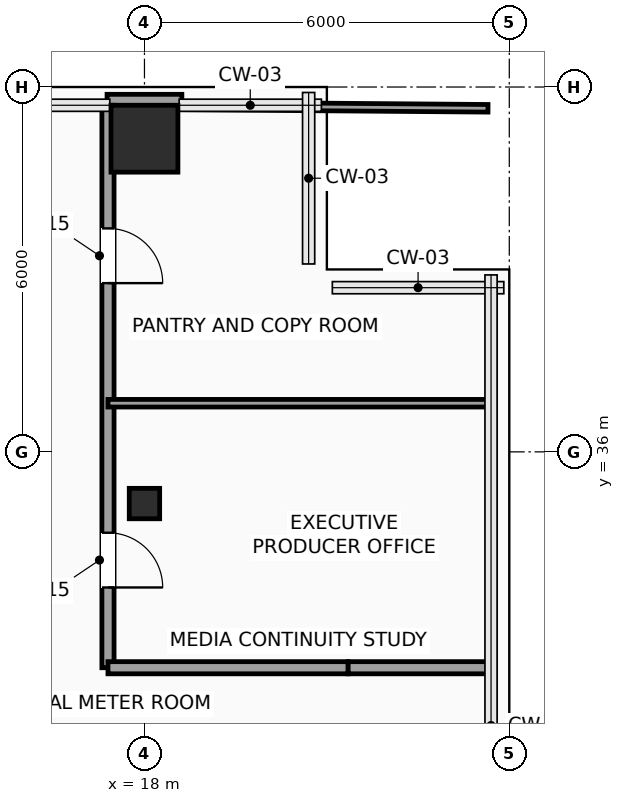
"""IFC4 building model, lengths in metres.
Left out: names, types, materials, properties, quantities, classifications, styles, units other than length and angle.
Written with IfcOpenShell. Run it as: python <this file> out.ifc"""

import sys

from ifc_helpers import new_model, si_unit, direction, frame, frame_2d, origin, origin_2d, place, context, subcontext, project, spatial, rectangle, hollow_rectangle, extrude, element, fill, save


model = new_model("IFC4")
c1 = context("Model", 3, precision=1e-05, world=origin(), true_north=direction((0.0, 1.0)))
c2 = subcontext(c1, "Body", "Model", "MODEL_VIEW")
j1 = project(units=[si_unit("LENGTHUNIT", "METRE"), si_unit("PLANEANGLEUNIT", "RADIAN")], contexts=[c1])
p1 = place(None, origin())
s1 = spatial("IfcSite", under=j1, at=p1, CompositionType="ELEMENT")
p2 = place(p1, origin())
s2 = spatial("IfcBuilding", under=s1, at=p2, CompositionType="ELEMENT")
p3 = place(p2, frame((0.0, 0.0, 153.15)))
s3 = spatial("IfcBuildingStorey", under=s2, at=p3, CompositionType="ELEMENT", Elevation=153.15)
p4 = place(p3, frame((18.0, 35.15, 0.0), z_axis=(0.0, 0.0, 1.0), x_axis=(1.0, 0.0, 0.0)))
e1 = element("IfcColumn", 1, at=p4, inside=s3, PredefinedType="COLUMN", context=c2, shape_type="SweptSolid", body=[
    extrude(hollow_rectangle(XDim=0.5, YDim=0.5, WallThickness=0.025, InnerFilletRadius=0.025, OuterFilletRadius=0.04, at=origin_2d()), origin(), (0.0, 0.0, 1.0), 3.75),
])
p5 = place(p3, frame((18.0, 41.15, 0.0), z_axis=(0.0, 0.0, 1.0), x_axis=(1.0, 0.0, 0.0)))
e2 = element("IfcColumn", 2, at=p5, inside=s3, PredefinedType="COLUMN", context=c2, shape_type="SweptSolid", body=[
    extrude(rectangle(XDim=1.1, YDim=1.1, at=origin_2d()), origin(), (0.0, 0.0, 1.0), 3.75),
])
p6 = place(p3, frame((17.385, 41.76, 0.0), z_axis=(0.0, 0.0, 1.0), x_axis=(1.0, 0.0, 0.0)))
e3 = element("IfcWall", 3, at=p6, inside=s3, PredefinedType="SOLIDWALL", context=c2, shape_type="SweptSolid", body=[
    extrude(rectangle(XDim=1.23, YDim=0.24, at=frame_2d((0.615, 0.0))), origin(), (0.0, 0.0, 1.0), 3.525),
])
p7 = place(p3, frame((17.4, 41.7, 0.0), z_axis=(0.0, 0.0, 1.0), x_axis=(0.0, -1.0, 0.0)))
e4 = element("IfcWall", 4, at=p7, inside=s3, PredefinedType="SOLIDWALL", context=c2, shape_type="SweptSolid", body=[
    extrude(rectangle(XDim=9.25, YDim=0.2, at=frame_2d((4.625, 0.0))), origin(), (0.0, 0.0, 1.0), 3.525),
])
p8 = place(p7, frame((7.03, 0.0, 0.0)))
e5 = element("IfcOpeningElement", 5, at=p8, cuts=e4, PredefinedType="OPENING", context=c2, shape_type="SweptSolid", body=[
    extrude(rectangle(XDim=0.9, YDim=2.1, at=frame_2d((0.45, 1.05))), frame((0.0, 0.11, 0.0), z_axis=(0.0, -1.0, 0.0), x_axis=(1.0, 0.0, 0.0)), (0.0, 0.0, 1.0), 0.22),
])
p9 = place(p7, frame((2.025, 0.0, 0.0)))
e6 = element("IfcOpeningElement", 6, at=p9, cuts=e4, PredefinedType="OPENING", context=c2, shape_type="SweptSolid", body=[
    extrude(rectangle(XDim=0.9, YDim=2.1, at=frame_2d((0.45, 1.05))), frame((0.0, 0.11, 0.0), z_axis=(0.0, -1.0, 0.0), x_axis=(1.0, 0.0, 0.0)), (0.0, 0.0, 1.0), 0.22),
])
p10 = place(p3, frame((17.4, 32.45, 0.0), z_axis=(0.0, 0.0, 1.0), x_axis=(1.0, 0.0, 0.0)))
e7 = element("IfcWall", 7, at=p10, inside=s3, PredefinedType="SOLIDWALL", context=c2, shape_type="SweptSolid", body=[
    extrude(rectangle(XDim=3.95, YDim=0.2, at=frame_2d((1.975, 0.0))), origin(), (0.0, 0.0, 1.0), 3.525),
])
p11 = place(p3, frame((21.35, 32.45, 0.0), z_axis=(0.0, 0.0, 1.0), x_axis=(1.0, 0.0, 0.0)))
e8 = element("IfcWall", 8, at=p11, inside=s3, PredefinedType="SOLIDWALL", context=c2, shape_type="SweptSolid", body=[
    extrude(rectangle(XDim=2.35, YDim=0.2, at=frame_2d((1.175, 0.0))), origin(), (0.0, 0.0, 1.0), 3.525),
])
p12 = place(p3, frame((17.4, 36.8, 0.0), z_axis=(0.0, 0.0, 1.0), x_axis=(1.0, 0.0, 0.0)))
e9 = element("IfcWall", 9, at=p12, inside=s3, PredefinedType="PARTITIONING", context=c2, shape_type="SweptSolid", body=[
    extrude(rectangle(XDim=6.3, YDim=0.125, at=frame_2d((3.15, 0.0))), origin(), (0.0, 0.0, 1.0), 3.525),
])
p13 = place(p3, frame((18.615, 41.69, 0.0), z_axis=(0.0, 0.0, 1.0), x_axis=(0.99996799533, -0.008000519771, 0.0)))
e10 = element("IfcWall", 10, at=p13, inside=s3, PredefinedType="PARTITIONING", context=c2, shape_type="SweptSolid", body=[
    extrude(rectangle(XDim=5.035, YDim=0.125, at=frame_2d((2.518, 0.0))), origin(), (0.0, 0.0, 1.0), 3.525),
])
p14 = place(p8, origin())
e11 = element("IfcDoor", 11, at=p14, inside=s3, OperationType="SINGLE_SWING_RIGHT", PredefinedType="DOOR", context=c2, shape_type="SweptSolid", body=[
    extrude(rectangle(XDim=0.9, YDim=2.1, at=frame_2d((0.45, 1.05))), frame((0.0, 0.025, 0.0), z_axis=(0.0, -1.0, 0.0), x_axis=(1.0, 0.0, 0.0)), (0.0, 0.0, 1.0), 0.05),
])
fill(e5, e11)
p15 = place(p9, origin())
e12 = element("IfcDoor", 12, at=p15, inside=s3, OperationType="SINGLE_SWING_RIGHT", PredefinedType="DOOR", context=c2, shape_type="SweptSolid", body=[
    extrude(rectangle(XDim=0.9, YDim=2.1, at=frame_2d((0.45, 1.05))), frame((0.0, 0.025, 0.0), z_axis=(0.0, -1.0, 0.0), x_axis=(1.0, 0.0, 0.0)), (0.0, 0.0, 1.0), 0.05),
])
fill(e6, e12)
save(model, sys.argv[1])
